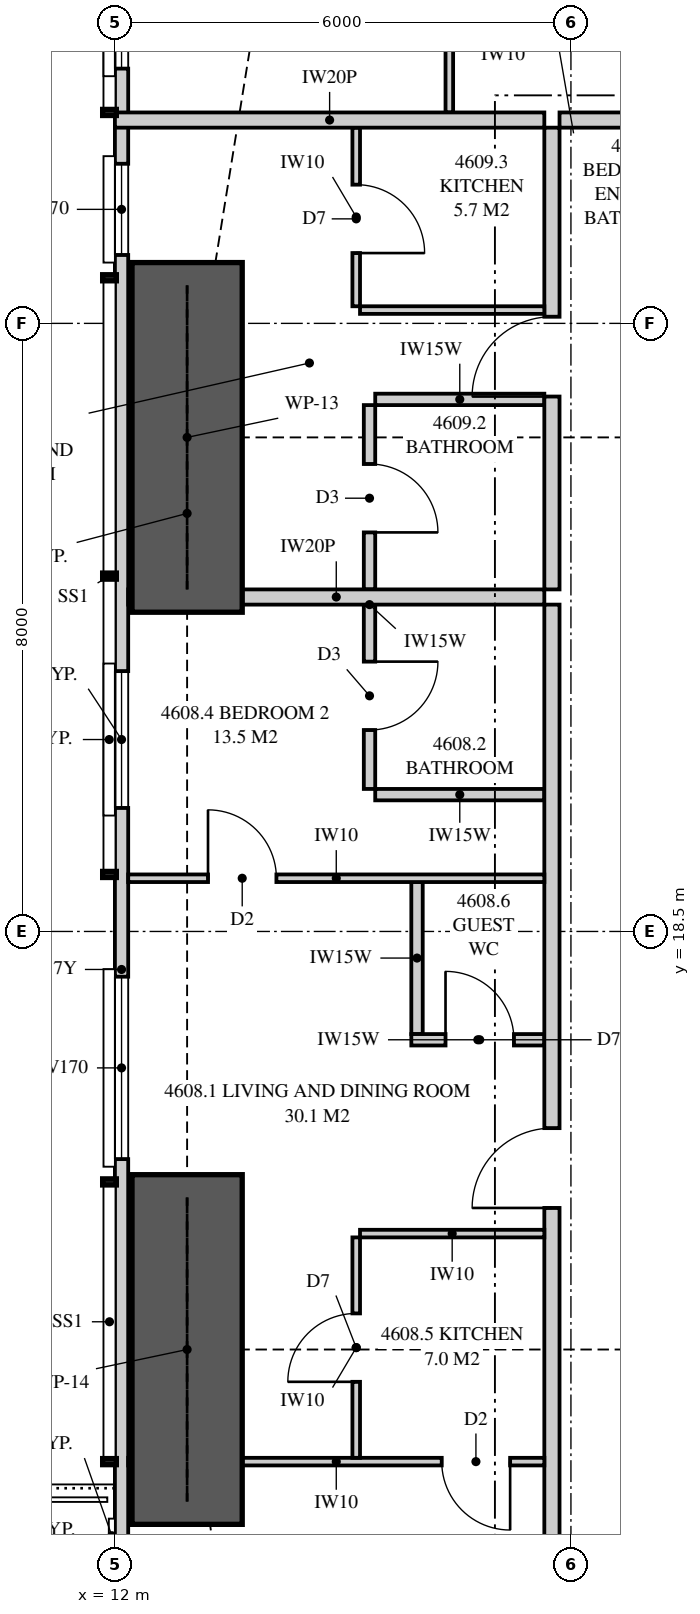
"""IFC4 building model, lengths in metres.
Left out: names, types, materials, properties, quantities, classifications, styles, units other than length and angle.
Written with IfcOpenShell. Run it as: python <this file> out.ifc"""

import sys

from ifc_helpers import new_model, si_unit, direction, frame, frame_2d, origin, place, context, subcontext, project, spatial, polyline, rectangle, outline, extrude, element, fill, save


model = new_model("IFC4")
c1 = context("Model", 3, precision=1e-05, world=origin(), true_north=direction((0.0, 1.0)))
c2 = subcontext(c1, "Body", "Model", "MODEL_VIEW")
j1 = project(units=[si_unit("LENGTHUNIT", "METRE"), si_unit("PLANEANGLEUNIT", "RADIAN")], contexts=[c1])
p1 = place(None, origin())
s1 = spatial("IfcSite", under=j1, at=p1, CompositionType="ELEMENT")
p2 = place(p1, origin())
s2 = spatial("IfcBuilding", under=s1, at=p2, CompositionType="ELEMENT")
p3 = place(p2, frame((0.0, 0.0, 171.1)))
s3 = spatial("IfcBuildingStorey", under=s2, at=p3, CompositionType="ELEMENT", Elevation=171.1)
p4 = place(p3, frame((12.087, 32.949, 0.0), z_axis=(0.0, 0.0, 1.0), x_axis=(0.0, -1.0, 0.0)))
e1 = element("IfcWall", 1, at=p4, inside=s3, PredefinedType="SOLIDWALL", context=c2, shape_type="SweptSolid", body=[
    extrude(outline(polyline([(0.0, 0.0), (29.897, 0.0), (29.897, 3.11), (20.191, 3.11), (20.191, 2.15), (20.051, 2.15), (20.051, 3.11), (19.949, 3.11), (19.949, 2.15), (7.949, 2.15), (7.949, 3.11), (7.823, 3.11), (7.823, 2.15), (7.73, 2.15), (7.73, 3.11), (0.0, 3.11), (0.0, 0.0)])), frame((0.0, 0.087, 0.0), z_axis=(0.0, -1.0, 0.0), x_axis=(1.0, 0.0, 0.0)), (0.0, 0.0, 1.0), 0.175),
])
p5 = place(p4, frame((1.297, 0.0, 0.4)))
e2 = element("IfcOpeningElement", 2, at=p5, cuts=e1, PredefinedType="OPENING", context=c2, shape_type="SweptSolid", body=[
    extrude(rectangle(XDim=1.8, YDim=1.7, at=frame_2d((0.9, 0.85))), frame((0.0, 0.097, 0.0), z_axis=(0.0, -1.0, 0.0), x_axis=(1.0, 0.0, 0.0)), (0.0, 0.0, 1.0), 0.195),
])
p6 = place(p4, frame((4.349, 0.0, 0.4)))
e3 = element("IfcOpeningElement", 3, at=p6, cuts=e1, PredefinedType="OPENING", context=c2, shape_type="SweptSolid", body=[
    extrude(rectangle(XDim=1.2, YDim=1.7, at=frame_2d((0.6, 0.85))), frame((0.0, 0.097, 0.0), z_axis=(0.0, -1.0, 0.0), x_axis=(1.0, 0.0, 0.0)), (0.0, 0.0, 1.0), 0.195),
])
p7 = place(p4, frame((11.024, 0.0, 0.4)))
e4 = element("IfcOpeningElement", 4, at=p7, cuts=e1, PredefinedType="OPENING", context=c2, shape_type="SweptSolid", body=[
    extrude(rectangle(XDim=1.8, YDim=1.7, at=frame_2d((0.9, 0.85))), frame((0.0, 0.097, 0.0), z_axis=(0.0, -1.0, 0.0), x_axis=(1.0, 0.0, 0.0)), (0.0, 0.0, 1.0), 0.195),
])
p8 = place(p4, frame((15.044, 0.0, 0.4)))
e5 = element("IfcOpeningElement", 5, at=p8, cuts=e1, PredefinedType="OPENING", context=c2, shape_type="SweptSolid", body=[
    extrude(rectangle(XDim=2.4, YDim=1.7, at=frame_2d((1.2, 0.85))), frame((0.0, 0.097, 0.0), z_axis=(0.0, -1.0, 0.0), x_axis=(1.0, 0.0, 0.0)), (0.0, 0.0, 1.0), 0.195),
])
p9 = place(p4, frame((22.624, 0.0, 0.0)))
e6 = element("IfcOpeningElement", 6, at=p9, cuts=e1, PredefinedType="OPENING", context=c2, shape_type="SweptSolid", body=[
    extrude(rectangle(XDim=1.8, YDim=2.1, at=frame_2d((0.9, 1.05))), frame((0.0, 0.097, 0.0), z_axis=(0.0, -1.0, 0.0), x_axis=(1.0, 0.0, 0.0)), (0.0, 0.0, 1.0), 0.195),
])
p10 = place(p4, frame((26.301, 0.0, 0.4)))
e7 = element("IfcOpeningElement", 7, at=p10, cuts=e1, PredefinedType="OPENING", context=c2, shape_type="SweptSolid", body=[
    extrude(rectangle(XDim=1.8, YDim=1.7, at=frame_2d((0.9, 0.85))), frame((0.0, 0.097, 0.0), z_axis=(0.0, -1.0, 0.0), x_axis=(1.0, 0.0, 0.0)), (0.0, 0.0, 1.0), 0.195),
])
p11 = place(p3, frame((17.85, 29.175, 0.0), z_axis=(0.0, 0.0, 1.0), x_axis=(1.0, 0.0, 0.0)))
e8 = element("IfcWall", 8, at=p11, inside=s3, PredefinedType="PARTITIONING", context=c2, shape_type="SweptSolid", body=[
    extrude(outline(polyline([(0.0, 0.0), (5.75, 0.0), (5.75, 3.11), (4.737, 3.11), (4.737, 2.541), (4.062, 2.541), (4.062, 3.11), (0.0, 3.11), (0.0, 0.0)])), frame((0.0, 0.1, 0.0), z_axis=(0.0, -1.0, 0.0), x_axis=(1.0, 0.0, 0.0)), (0.0, 0.0, 1.0), 0.2),
])
p12 = place(p11, frame((2.35, 0.0, 0.0)))
e9 = element("IfcOpeningElement", 9, at=p12, cuts=e8, PredefinedType="OPENING", context=c2, shape_type="SweptSolid", body=[
    extrude(rectangle(XDim=1.05, YDim=2.2, at=frame_2d((0.525, 1.1))), frame((0.0, 0.11, 0.0), z_axis=(0.0, -1.0, 0.0), x_axis=(1.0, 0.0, 0.0)), (0.0, 0.0, 1.0), 0.22),
])
p13 = place(p3, frame((16.4, 32.204, 0.0), z_axis=(0.0, 0.0, 1.0), x_axis=(0.0, -1.0, 0.0)))
e10 = element("IfcWall", 10, at=p13, inside=s3, PredefinedType="PARTITIONING", context=c2, shape_type="SweptSolid", body=[
    extrude(rectangle(XDim=2.929, YDim=0.1, at=frame_2d((1.464, 0.0))), origin(), (0.0, 0.0, 1.0), 3.11),
])
p14 = place(p13, frame((0.977, 0.0, 0.0)))
e11 = element("IfcOpeningElement", 11, at=p14, cuts=e10, PredefinedType="OPENING", context=c2, shape_type="SweptSolid", body=[
    extrude(rectangle(XDim=0.9, YDim=2.1, at=frame_2d((0.45, 1.05))), frame((0.0, 0.06, 0.0), z_axis=(0.0, -1.0, 0.0), x_axis=(1.0, 0.0, 0.0)), (0.0, 0.0, 1.0), 0.12),
])
p15 = place(p3, frame((12.0, 29.175, 0.0), z_axis=(0.0, 0.0, 1.0), x_axis=(1.0, 0.0, 0.0)))
e12 = element("IfcWall", 12, at=p15, inside=s3, PredefinedType="PARTITIONING", context=c2, shape_type="SweptSolid", body=[
    extrude(outline(polyline([(0.0, 0.0), (5.65, 0.0), (5.65, 3.11), (2.547, 3.11), (2.547, 2.15), (0.703, 2.15), (0.703, 3.11), (0.0, 3.11), (0.0, 0.0)])), frame((0.0, 0.1, 0.0), z_axis=(0.0, -1.0, 0.0), x_axis=(1.0, 0.0, 0.0)), (0.0, 0.0, 1.0), 0.2),
])
p16 = place(p3, frame((12.175, 22.9, 0.0), z_axis=(0.0, 0.0, 1.0), x_axis=(1.0, 0.0, 0.0)))
e13 = element("IfcWall", 13, at=p16, inside=s3, PredefinedType="PARTITIONING", context=c2, shape_type="SweptSolid", body=[
    extrude(outline(polyline([(0.0, 0.0), (5.475, 0.0), (5.475, 3.11), (1.685, 3.11), (1.685, 2.15), (0.0, 2.15), (0.0, 3.11), (0.0, 0.0)])), frame((0.0, 0.1, 0.0), z_axis=(0.0, -1.0, 0.0), x_axis=(1.0, 0.0, 0.0)), (0.0, 0.0, 1.0), 0.2),
])
p17 = place(p3, frame((17.75, 7.925, 0.0), z_axis=(0.0, 0.0, 1.0), x_axis=(0.0, 1.0, 0.0)))
e14 = element("IfcWall", 14, at=p17, inside=s3, PredefinedType="PARTITIONING", context=c2, shape_type="SweptSolid", body=[
    extrude(outline(polyline([(0.0, 0.0), (14.875, 0.0), (14.875, 3.11), (5.412, 3.11), (5.412, 2.541), (4.738, 2.541), (4.738, 3.11), (0.0, 3.11), (0.0, 0.0)])), frame((0.0, 0.1, 0.0), z_axis=(0.0, -1.0, 0.0), x_axis=(1.0, 0.0, 0.0)), (0.0, 0.0, 1.0), 0.2),
])
p18 = place(p17, frame((6.938, 0.0, 0.0)))
e15 = element("IfcOpeningElement", 15, at=p18, cuts=e14, PredefinedType="OPENING", context=c2, shape_type="SweptSolid", body=[
    extrude(rectangle(XDim=1.05, YDim=2.2, at=frame_2d((0.525, 1.1))), frame((0.0, 0.11, 0.0), z_axis=(0.0, -1.0, 0.0), x_axis=(1.0, 0.0, 0.0)), (0.0, 0.0, 1.0), 0.22),
])
p19 = place(p3, frame((15.35, 20.375, 0.0), z_axis=(0.0, 0.0, 1.0), x_axis=(0.0, 1.0, 0.0)))
e16 = element("IfcWall", 16, at=p19, inside=s3, PredefinedType="PLUMBINGWALL", context=c2, shape_type="SweptSolid", body=[
    extrude(rectangle(XDim=2.425, YDim=0.15, at=frame_2d((1.212, 0.0))), origin(), (0.0, 0.0, 1.0), 3.11),
])
p20 = place(p19, frame((0.775, 0.0, 0.0)))
e17 = element("IfcOpeningElement", 17, at=p20, cuts=e16, PredefinedType="OPENING", context=c2, shape_type="SweptSolid", body=[
    extrude(rectangle(XDim=0.9, YDim=2.1, at=frame_2d((0.45, 1.05))), frame((0.0, 0.085, 0.0), z_axis=(0.0, -1.0, 0.0), x_axis=(1.0, 0.0, 0.0)), (0.0, 0.0, 1.0), 0.17),
])
p21 = place(p3, frame((15.425, 20.3, 0.0), z_axis=(0.0, 0.0, 1.0), x_axis=(1.0, 0.0, 0.0)))
e18 = element("IfcWall", 18, at=p21, inside=s3, PredefinedType="PLUMBINGWALL", context=c2, shape_type="SweptSolid", body=[
    extrude(rectangle(XDim=2.225, YDim=0.15, at=frame_2d((1.112, 0.0))), origin(), (0.0, 0.0, 1.0), 3.11),
])
p22 = place(p3, frame((12.175, 11.525, 0.0), z_axis=(0.0, 0.0, 1.0), x_axis=(1.0, 0.0, 0.0)))
e19 = element("IfcWall", 19, at=p22, inside=s3, PredefinedType="PARTITIONING", context=c2, shape_type="SweptSolid", body=[
    extrude(outline(polyline([(0.101, 3.11), (0.0, 3.11), (0.0, 0.0), (0.529, 0.0), (0.529, 0.269), (1.021, 0.269), (1.021, 0.0), (5.475, 0.0), (5.475, 3.11), (1.836, 3.11), (1.836, 2.15), (1.021, 2.15), (1.021, 1.881), (0.529, 1.881), (0.529, 2.15), (0.101, 2.15), (0.101, 3.11)])), frame((0.0, 0.05, 0.0), z_axis=(0.0, -1.0, 0.0), x_axis=(1.0, 0.0, 0.0)), (0.0, 0.0, 1.0), 0.1),
])
p23 = place(p22, frame((4.125, 0.0, 0.0)))
e20 = element("IfcOpeningElement", 20, at=p23, cuts=e19, PredefinedType="OPENING", context=c2, shape_type="SweptSolid", body=[
    extrude(rectangle(XDim=0.9, YDim=2.1, at=frame_2d((0.45, 1.05))), frame((0.0, 0.06, 0.0), z_axis=(0.0, -1.0, 0.0), x_axis=(1.0, 0.0, 0.0)), (0.0, 0.0, 1.0), 0.12),
])
p24 = place(p3, frame((12.175, 19.2, 0.0), z_axis=(0.0, 0.0, 1.0), x_axis=(1.0, 0.0, 0.0)))
e21 = element("IfcWall", 21, at=p24, inside=s3, PredefinedType="PARTITIONING", context=c2, shape_type="SweptSolid", body=[
    extrude(outline(polyline([(0.0, 0.0), (5.475, 0.0), (5.475, 3.11), (1.635, 3.11), (1.635, 2.15), (0.0, 2.15), (0.0, 3.11), (0.0, 0.0)])), frame((0.0, 0.05, 0.0), z_axis=(0.0, -1.0, 0.0), x_axis=(1.0, 0.0, 0.0)), (0.0, 0.0, 1.0), 0.1),
])
p25 = place(p24, frame((1.05, 0.0, 0.0)))
e22 = element("IfcOpeningElement", 22, at=p25, cuts=e21, PredefinedType="OPENING", context=c2, shape_type="SweptSolid", body=[
    extrude(rectangle(XDim=0.9, YDim=2.1, at=frame_2d((0.45, 1.05))), frame((0.0, 0.06, 0.0), z_axis=(0.0, -1.0, 0.0), x_axis=(1.0, 0.0, 0.0)), (0.0, 0.0, 1.0), 0.12),
])
p26 = place(p3, frame((15.175, 11.575, 0.0), z_axis=(0.0, 0.0, 1.0), x_axis=(0.0, 1.0, 0.0)))
e23 = element("IfcWall", 23, at=p26, inside=s3, PredefinedType="PARTITIONING", context=c2, shape_type="SweptSolid", body=[
    extrude(outline(polyline([(0.0, 0.0), (2.9, 0.0), (2.9, 3.11), (1.712, 3.11), (1.712, 2.541), (1.138, 2.541), (1.138, 3.11), (0.0, 3.11), (0.0, 0.0)])), frame((0.0, 0.05, 0.0), z_axis=(0.0, -1.0, 0.0), x_axis=(1.0, 0.0, 0.0)), (0.0, 0.0, 1.0), 0.1),
])
p27 = place(p26, frame((1.0, 0.0, 0.0)))
e24 = element("IfcOpeningElement", 24, at=p27, cuts=e23, PredefinedType="OPENING", context=c2, shape_type="SweptSolid", body=[
    extrude(rectangle(XDim=0.9, YDim=2.1, at=frame_2d((0.45, 1.05))), frame((0.0, 0.06, 0.0), z_axis=(0.0, -1.0, 0.0), x_axis=(1.0, 0.0, 0.0)), (0.0, 0.0, 1.0), 0.12),
])
p28 = place(p3, frame((15.225, 14.525, 0.0), z_axis=(0.0, 0.0, 1.0), x_axis=(1.0, 0.0, 0.0)))
e25 = element("IfcWall", 25, at=p28, inside=s3, PredefinedType="PARTITIONING", context=c2, shape_type="SweptSolid", body=[
    extrude(rectangle(XDim=2.425, YDim=0.1, at=frame_2d((1.212, 0.0))), origin(), (0.0, 0.0, 1.0), 3.11),
])
p29 = place(p3, frame((17.75, 23.0, 0.0), z_axis=(0.0, 0.0, 1.0), x_axis=(0.0, 1.0, 0.0)))
e26 = element("IfcWall", 26, at=p29, inside=s3, PredefinedType="PARTITIONING", context=c2, shape_type="SweptSolid", body=[
    extrude(outline(polyline([(0.0, 0.0), (6.075, 0.0), (6.075, 3.11), (2.337, 3.11), (2.337, 2.541), (1.663, 2.541), (1.663, 3.11), (0.0, 3.11), (0.0, 0.0)])), frame((0.0, 0.1, 0.0), z_axis=(0.0, -1.0, 0.0), x_axis=(1.0, 0.0, 0.0)), (0.0, 0.0, 1.0), 0.2),
])
p30 = place(p29, frame((2.538, 0.0, 0.0)))
e27 = element("IfcOpeningElement", 27, at=p30, cuts=e26, PredefinedType="OPENING", context=c2, shape_type="SweptSolid", body=[
    extrude(rectangle(XDim=1.05, YDim=2.2, at=frame_2d((0.525, 1.1))), frame((0.0, 0.11, 0.0), z_axis=(0.0, -1.0, 0.0), x_axis=(1.0, 0.0, 0.0)), (0.0, 0.0, 1.0), 0.22),
])
p31 = place(p3, frame((15.35, 23.0, 0.0), z_axis=(0.0, 0.0, 1.0), x_axis=(0.0, 1.0, 0.0)))
e28 = element("IfcWall", 28, at=p31, inside=s3, PredefinedType="PLUMBINGWALL", context=c2, shape_type="SweptSolid", body=[
    extrude(outline(polyline([(0.0, 0.0), (2.425, 0.0), (2.425, 3.11), (2.312, 3.11), (2.312, 2.541), (1.688, 2.541), (1.688, 3.11), (0.0, 3.11), (0.0, 0.0)])), frame((0.0, 0.075, 0.0), z_axis=(0.0, -1.0, 0.0), x_axis=(1.0, 0.0, 0.0)), (0.0, 0.0, 1.0), 0.15),
])
p32 = place(p31, frame((0.75, 0.0, 0.0)))
e29 = element("IfcOpeningElement", 29, at=p32, cuts=e28, PredefinedType="OPENING", context=c2, shape_type="SweptSolid", body=[
    extrude(rectangle(XDim=0.9, YDim=2.1, at=frame_2d((0.45, 1.05))), frame((0.0, 0.085, 0.0), z_axis=(0.0, -1.0, 0.0), x_axis=(1.0, 0.0, 0.0)), (0.0, 0.0, 1.0), 0.17),
])
p33 = place(p3, frame((15.425, 25.5, 0.0), z_axis=(0.0, 0.0, 1.0), x_axis=(1.0, 0.0, 0.0)))
e30 = element("IfcWall", 30, at=p33, inside=s3, PredefinedType="PLUMBINGWALL", context=c2, shape_type="SweptSolid", body=[
    extrude(rectangle(XDim=2.225, YDim=0.15, at=frame_2d((1.112, 0.0))), origin(), (0.0, 0.0, 1.0), 3.11),
])
p34 = place(p3, frame((15.175, 26.725, 0.0), z_axis=(0.0, 0.0, 1.0), x_axis=(0.0, 1.0, 0.0)))
e31 = element("IfcWall", 31, at=p34, inside=s3, PredefinedType="PARTITIONING", context=c2, shape_type="SweptSolid", body=[
    extrude(rectangle(XDim=2.35, YDim=0.1, at=frame_2d((1.175, 0.0))), origin(), (0.0, 0.0, 1.0), 3.11),
])
p35 = place(p34, frame((0.7, 0.0, 0.0)))
e32 = element("IfcOpeningElement", 32, at=p35, cuts=e31, PredefinedType="OPENING", context=c2, shape_type="SweptSolid", body=[
    extrude(rectangle(XDim=0.9, YDim=2.1, at=frame_2d((0.45, 1.05))), frame((0.0, 0.06, 0.0), z_axis=(0.0, -1.0, 0.0), x_axis=(1.0, 0.0, 0.0)), (0.0, 0.0, 1.0), 0.12),
])
p36 = place(p3, frame((15.225, 26.675, 0.0), z_axis=(0.0, 0.0, 1.0), x_axis=(1.0, 0.0, 0.0)))
e33 = element("IfcWall", 33, at=p36, inside=s3, PredefinedType="PARTITIONING", context=c2, shape_type="SweptSolid", body=[
    extrude(rectangle(XDim=2.425, YDim=0.1, at=frame_2d((1.212, 0.0))), origin(), (0.0, 0.0, 1.0), 3.11),
])
p37 = place(p3, frame((17.65, 17.075, 0.0), z_axis=(0.0, 0.0, 1.0), x_axis=(-1.0, 0.0, 0.0)))
e34 = element("IfcWall", 34, at=p37, inside=s3, PredefinedType="PLUMBINGWALL", context=c2, shape_type="SweptSolid", body=[
    extrude(rectangle(XDim=1.75, YDim=0.15, at=frame_2d((0.875, 0.0))), origin(), (0.0, 0.0, 1.0), 3.11),
])
p38 = place(p37, frame((0.4, 0.0, 0.0)))
e35 = element("IfcOpeningElement", 35, at=p38, cuts=e34, PredefinedType="OPENING", context=c2, shape_type="SweptSolid", body=[
    extrude(rectangle(XDim=0.9, YDim=2.1, at=frame_2d((0.45, 1.05))), frame((0.0, 0.085, 0.0), z_axis=(0.0, -1.0, 0.0), x_axis=(1.0, 0.0, 0.0)), (0.0, 0.0, 1.0), 0.17),
])
p39 = place(p3, frame((15.975, 19.15, 0.0), z_axis=(0.0, 0.0, 1.0), x_axis=(0.0, -1.0, 0.0)))
e36 = element("IfcWall", 36, at=p39, inside=s3, PredefinedType="PLUMBINGWALL", context=c2, shape_type="SweptSolid", body=[
    extrude(rectangle(XDim=2.0, YDim=0.15, at=frame_2d((1.0, 0.0))), origin(), (0.0, 0.0, 1.0), 3.11),
])
for number, where, z_axis, x_axis in (
    (37, (12.95, 22.7, 0.0), (0.0, 0.0, 1.0), (0.0, 1.0, 0.0)),
    (38, (12.95, 10.7, 0.0), (0.0, 0.0, 1.0), (0.0, 1.0, 0.0)),
):
    element("IfcWall", number, at=place(p3, frame(where, z_axis=z_axis, x_axis=x_axis)), inside=s3, PredefinedType="SHEAR", context=c2, shape_type="SweptSolid", body=[
        extrude(rectangle(XDim=4.6, YDim=1.45, at=frame_2d((2.3, 0.0))), origin(), (0.0, 0.0, 1.0), 3.35),
    ])
p40 = place(p5, origin())
e39 = element("IfcWindow", 39, at=p40, inside=s3, PartitioningType="SINGLE_PANEL", PredefinedType="WINDOW", context=c2, shape_type="SweptSolid", body=[
    extrude(rectangle(XDim=1.8, YDim=1.7, at=frame_2d((0.9, 0.85))), frame((0.0, 0.03, 0.0), z_axis=(0.0, -1.0, 0.0), x_axis=(1.0, 0.0, 0.0)), (0.0, 0.0, 1.0), 0.06),
])
fill(e2, e39)
p41 = place(p6, origin())
e40 = element("IfcWindow", 40, at=p41, inside=s3, PartitioningType="SINGLE_PANEL", PredefinedType="WINDOW", context=c2, shape_type="SweptSolid", body=[
    extrude(rectangle(XDim=1.2, YDim=1.7, at=frame_2d((0.6, 0.85))), frame((0.0, 0.03, 0.0), z_axis=(0.0, -1.0, 0.0), x_axis=(1.0, 0.0, 0.0)), (0.0, 0.0, 1.0), 0.06),
])
fill(e3, e40)
p42 = place(p7, origin())
e41 = element("IfcWindow", 41, at=p42, inside=s3, PartitioningType="SINGLE_PANEL", PredefinedType="WINDOW", context=c2, shape_type="SweptSolid", body=[
    extrude(rectangle(XDim=1.8, YDim=1.7, at=frame_2d((0.9, 0.85))), frame((0.0, 0.03, 0.0), z_axis=(0.0, -1.0, 0.0), x_axis=(1.0, 0.0, 0.0)), (0.0, 0.0, 1.0), 0.06),
])
fill(e4, e41)
p43 = place(p8, origin())
e42 = element("IfcWindow", 42, at=p43, inside=s3, PartitioningType="SINGLE_PANEL", PredefinedType="WINDOW", context=c2, shape_type="SweptSolid", body=[
    extrude(rectangle(XDim=2.4, YDim=1.7, at=frame_2d((1.2, 0.85))), frame((0.0, 0.03, 0.0), z_axis=(0.0, -1.0, 0.0), x_axis=(1.0, 0.0, 0.0)), (0.0, 0.0, 1.0), 0.06),
])
fill(e5, e42)
p44 = place(p18, origin())
e43 = element("IfcDoor", 43, at=p44, inside=s3, OperationType="SINGLE_SWING_LEFT", PredefinedType="DOOR", context=c2, shape_type="SweptSolid", body=[
    extrude(rectangle(XDim=1.05, YDim=2.2, at=frame_2d((0.525, 1.1))), frame((0.0, 0.025, 0.0), z_axis=(0.0, -1.0, 0.0), x_axis=(1.0, 0.0, 0.0)), (0.0, 0.0, 1.0), 0.05),
])
fill(e15, e43)
p45 = place(p20, frame((0.9, 0.0, 0.0), z_axis=(0.0, 0.0, 1.0), x_axis=(-1.0, 0.0, 0.0)))
e44 = element("IfcDoor", 44, at=p45, inside=s3, OperationType="SINGLE_SWING_LEFT", PredefinedType="DOOR", context=c2, shape_type="SweptSolid", body=[
    extrude(rectangle(XDim=0.9, YDim=2.1, at=frame_2d((0.45, 1.05))), frame((0.0, 0.025, 0.0), z_axis=(0.0, -1.0, 0.0), x_axis=(1.0, 0.0, 0.0)), (0.0, 0.0, 1.0), 0.05),
])
fill(e17, e44)
p46 = place(p23, frame((0.9, 0.0, 0.0), z_axis=(0.0, 0.0, 1.0), x_axis=(-1.0, 0.0, 0.0)))
e45 = element("IfcDoor", 45, at=p46, inside=s3, OperationType="SINGLE_SWING_LEFT", PredefinedType="DOOR", context=c2, shape_type="SweptSolid", body=[
    extrude(rectangle(XDim=0.9, YDim=2.1, at=frame_2d((0.45, 1.05))), frame((0.0, 0.025, 0.0), z_axis=(0.0, -1.0, 0.0), x_axis=(1.0, 0.0, 0.0)), (0.0, 0.0, 1.0), 0.05),
])
fill(e20, e45)
p47 = place(p25, origin())
e46 = element("IfcDoor", 46, at=p47, inside=s3, OperationType="SINGLE_SWING_LEFT", PredefinedType="DOOR", context=c2, shape_type="SweptSolid", body=[
    extrude(rectangle(XDim=0.9, YDim=2.1, at=frame_2d((0.45, 1.05))), frame((0.0, 0.025, 0.0), z_axis=(0.0, -1.0, 0.0), x_axis=(1.0, 0.0, 0.0)), (0.0, 0.0, 1.0), 0.05),
])
fill(e22, e46)
p48 = place(p27, origin())
e47 = element("IfcDoor", 47, at=p48, inside=s3, OperationType="SINGLE_SWING_LEFT", PredefinedType="DOOR", context=c2, shape_type="SweptSolid", body=[
    extrude(rectangle(XDim=0.9, YDim=2.1, at=frame_2d((0.45, 1.05))), frame((0.0, 0.025, 0.0), z_axis=(0.0, -1.0, 0.0), x_axis=(1.0, 0.0, 0.0)), (0.0, 0.0, 1.0), 0.05),
])
fill(e24, e47)
p49 = place(p30, origin())
e48 = element("IfcDoor", 48, at=p49, inside=s3, OperationType="SINGLE_SWING_LEFT", PredefinedType="DOOR", context=c2, shape_type="SweptSolid", body=[
    extrude(rectangle(XDim=1.05, YDim=2.2, at=frame_2d((0.525, 1.1))), frame((0.0, 0.025, 0.0), z_axis=(0.0, -1.0, 0.0), x_axis=(1.0, 0.0, 0.0)), (0.0, 0.0, 1.0), 0.05),
])
fill(e27, e48)
p50 = place(p32, frame((0.9, 0.0, 0.0), z_axis=(0.0, 0.0, 1.0), x_axis=(-1.0, 0.0, 0.0)))
e49 = element("IfcDoor", 49, at=p50, inside=s3, OperationType="SINGLE_SWING_RIGHT", PredefinedType="DOOR", context=c2, shape_type="SweptSolid", body=[
    extrude(rectangle(XDim=0.9, YDim=2.1, at=frame_2d((0.45, 1.05))), frame((0.0, 0.025, 0.0), z_axis=(0.0, -1.0, 0.0), x_axis=(1.0, 0.0, 0.0)), (0.0, 0.0, 1.0), 0.05),
])
fill(e29, e49)
p51 = place(p35, frame((0.9, 0.0, 0.0), z_axis=(0.0, 0.0, 1.0), x_axis=(-1.0, 0.0, 0.0)))
e50 = element("IfcDoor", 50, at=p51, inside=s3, OperationType="SINGLE_SWING_RIGHT", PredefinedType="DOOR", context=c2, shape_type="SweptSolid", body=[
    extrude(rectangle(XDim=0.9, YDim=2.1, at=frame_2d((0.45, 1.05))), frame((0.0, 0.025, 0.0), z_axis=(0.0, -1.0, 0.0), x_axis=(1.0, 0.0, 0.0)), (0.0, 0.0, 1.0), 0.05),
])
fill(e32, e50)
p52 = place(p38, frame((0.9, 0.0, 0.0), z_axis=(0.0, 0.0, 1.0), x_axis=(-1.0, 0.0, 0.0)))
e51 = element("IfcDoor", 51, at=p52, inside=s3, OperationType="SINGLE_SWING_LEFT", PredefinedType="DOOR", context=c2, shape_type="SweptSolid", body=[
    extrude(rectangle(XDim=0.9, YDim=2.1, at=frame_2d((0.45, 1.05))), frame((0.0, 0.025, 0.0), z_axis=(0.0, -1.0, 0.0), x_axis=(1.0, 0.0, 0.0)), (0.0, 0.0, 1.0), 0.05),
])
fill(e35, e51)
save(model, sys.argv[1])
